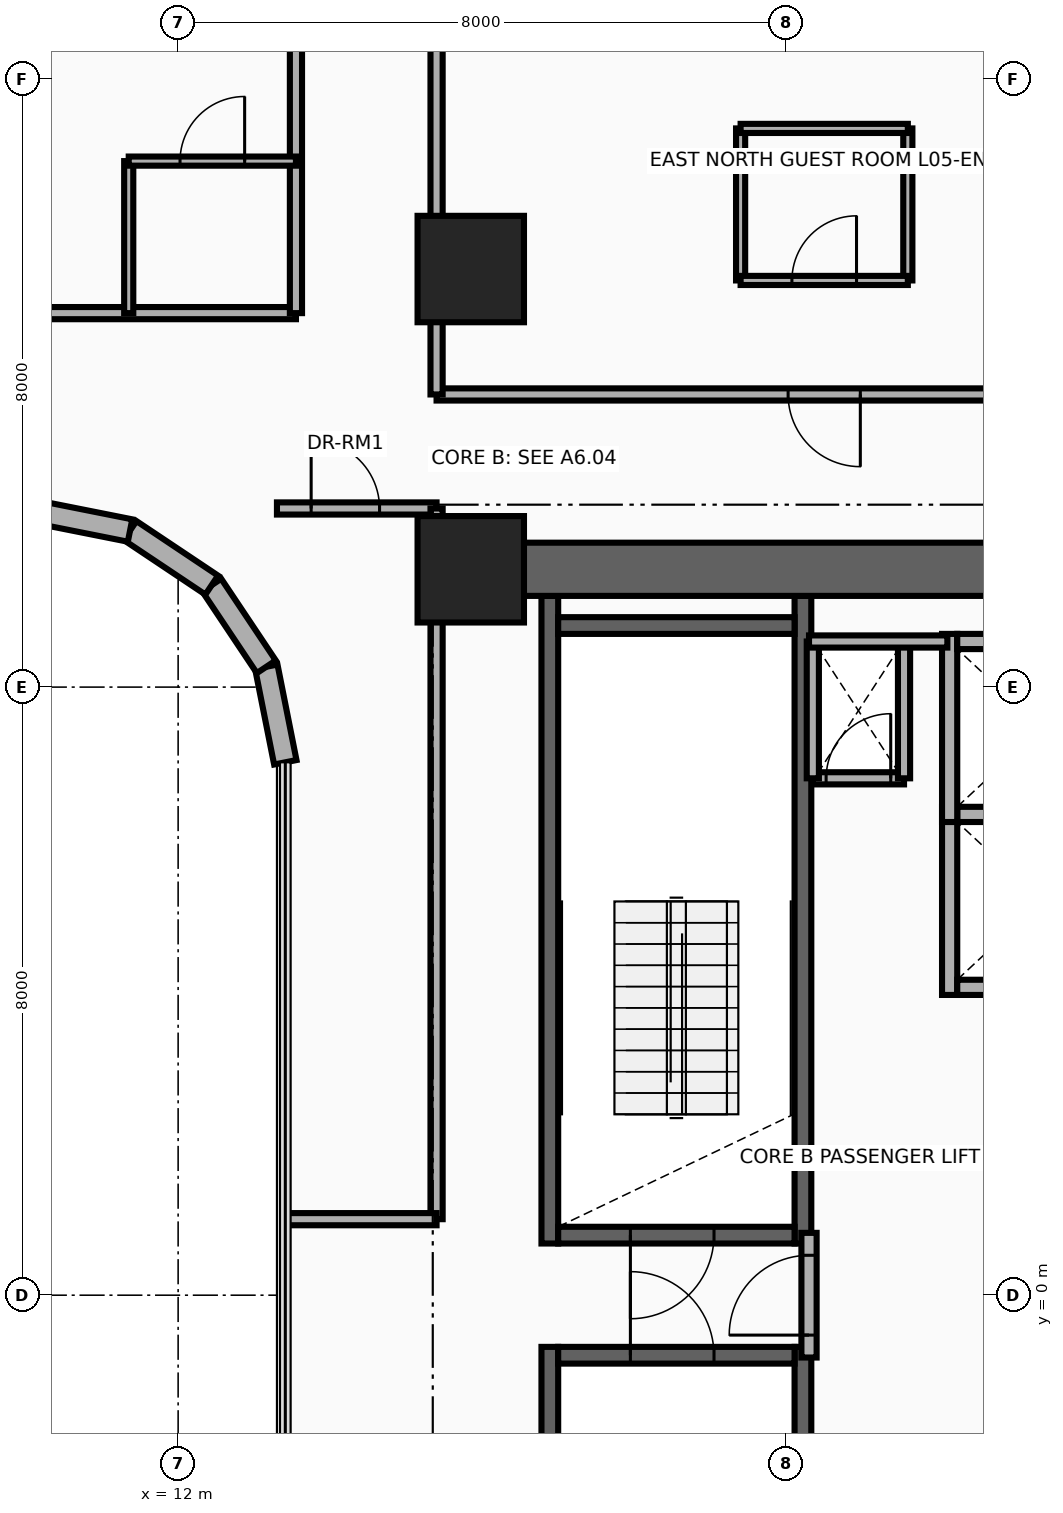
"""IFC4 building model, lengths in metres.
Left out: names, types, materials, properties, quantities, classifications, styles, units other than length and angle.
Written with IfcOpenShell. Run it as: python <this file> out.ifc"""

import sys

from ifc_helpers import new_model, si_unit, direction, frame, frame_2d, origin, origin_2d, place, context, subcontext, project, spatial, rectangle, extrude, source, transform, mapped, element, fill, save


model = new_model("IFC4")
c1 = context("Model", 3, precision=1e-05, world=origin(), true_north=direction((0.0, 1.0)))
c2 = subcontext(c1, "Body", "Model", "MODEL_VIEW")
j1 = project(units=[si_unit("LENGTHUNIT", "METRE"), si_unit("PLANEANGLEUNIT", "RADIAN")], contexts=[c1])
p1 = place(None, origin())
s1 = spatial("IfcSite", under=j1, at=p1, CompositionType="ELEMENT")
p2 = place(p1, origin())
s2 = spatial("IfcBuilding", under=s1, at=p2, CompositionType="ELEMENT")
p3 = place(p2, frame((0.0, 0.0, 26.0)))
s3 = spatial("IfcBuildingStorey", under=s2, at=p3, CompositionType="ELEMENT", Elevation=26.0)
for number, where, z_axis, x_axis in (
    (1, (16.89, 0.68, 0.0), (0.0, 0.0, 1.0), (0.0, 1.0, 0.0)),
    (2, (20.22, 0.68, 0.0), (0.0, 0.0, 1.0), (0.0, 1.0, 0.0)),
):
    element("IfcWall", number, at=place(p3, frame(where, z_axis=z_axis, x_axis=x_axis)), inside=s3, PredefinedType="SHEAR", context=c2, shape_type="SweptSolid", body=[
        extrude(rectangle(XDim=8.52, YDim=0.22, at=frame_2d((4.26, 0.0))), origin(), (0.0, 0.0, 1.0), 3.46),
    ])
p4 = place(p3, frame((17.0, 0.79, 0.0), z_axis=(0.0, 0.0, 1.0), x_axis=(1.0, 0.0, 0.0)))
e3 = element("IfcWall", 3, at=p4, inside=s3, PredefinedType="SHEAR", context=c2, shape_type="SweptSolid", body=[
    extrude(rectangle(XDim=3.11, YDim=0.22, at=frame_2d((1.555, 0.0))), origin(), (0.0, 0.0, 1.0), 3.46),
])
p5 = place(p4, frame((0.95, 0.0, 0.0)))
e4 = element("IfcOpeningElement", 4, at=p5, cuts=e3, PredefinedType="OPENING", context=c2, shape_type="SweptSolid", body=[
    extrude(rectangle(XDim=1.1, YDim=2.15, at=frame_2d((0.55, 1.075))), frame((0.0, 0.125, 0.0), z_axis=(0.0, -1.0, 0.0), x_axis=(1.0, 0.0, 0.0)), (0.0, 0.0, 1.0), 0.25),
])
p6 = place(p3, frame((17.0, 8.81, 0.0), z_axis=(0.0, 0.0, 1.0), x_axis=(1.0, 0.0, 0.0)))
e5 = element("IfcWall", 5, at=p6, inside=s3, PredefinedType="SHEAR", context=c2, shape_type="SweptSolid", body=[
    extrude(rectangle(XDim=3.11, YDim=0.22, at=frame_2d((1.555, 0.0))), origin(), (0.0, 0.0, 1.0), 3.46),
])
for number, where, z_axis, x_axis in (
    (6, (16.89, -9.2, 0.0), (0.0, 0.0, 1.0), (0.0, 1.0, 0.0)),
    (7, (20.22, -9.2, 0.0), (0.0, 0.0, 1.0), (0.0, 1.0, 0.0)),
):
    element("IfcWall", number, at=place(p3, frame(where, z_axis=z_axis, x_axis=x_axis)), inside=s3, PredefinedType="SHEAR", context=c2, shape_type="SweptSolid", body=[
        extrude(rectangle(XDim=8.52, YDim=0.22, at=frame_2d((4.26, 0.0))), origin(), (0.0, 0.0, 1.0), 3.46),
    ])
p7 = place(p3, frame((17.0, -0.79, 0.0), z_axis=(0.0, 0.0, 1.0), x_axis=(1.0, 0.0, 0.0)))
e8 = element("IfcWall", 8, at=p7, inside=s3, PredefinedType="SHEAR", context=c2, shape_type="SweptSolid", body=[
    extrude(rectangle(XDim=3.11, YDim=0.22, at=frame_2d((1.555, 0.0))), origin(), (0.0, 0.0, 1.0), 3.46),
])
p8 = place(p7, frame((0.95, 0.0, 0.0)))
e9 = element("IfcOpeningElement", 9, at=p8, cuts=e8, PredefinedType="OPENING", context=c2, shape_type="SweptSolid", body=[
    extrude(rectangle(XDim=1.1, YDim=2.15, at=frame_2d((0.55, 1.075))), frame((0.0, 0.125, 0.0), z_axis=(0.0, -1.0, 0.0), x_axis=(1.0, 0.0, 0.0)), (0.0, 0.0, 1.0), 0.25),
])
p9 = place(p3, frame((15.85, 9.55, 0.0), z_axis=(0.0, 0.0, 1.0), x_axis=(1.0, 0.0, 0.0)))
e10 = element("IfcWall", 10, at=p9, inside=s3, PredefinedType="SHEAR", context=c2, shape_type="SweptSolid", body=[
    extrude(rectangle(XDim=9.0, YDim=0.7, at=frame_2d((4.5, 0.0))), origin(), (0.0, 0.0, 1.0), 3.46),
])
m1 = source(origin(), c2, "Body", "SweptSolid", [
    extrude(rectangle(XDim=1.4, YDim=1.4, at=origin_2d()), origin(), (0.0, 0.0, 1.0), 3.7),
])
for number, where, z_axis, x_axis in (
    (11, (15.85, 9.55, 0.0), (0.0, 0.0, 1.0), (1.0, 0.0, 0.0)),
    (12, (15.85, 13.5, 0.0), (0.0, 0.0, 1.0), (1.0, 0.0, 0.0)),
):
    element("IfcColumn", number, at=place(p3, frame(where, z_axis=z_axis, x_axis=x_axis)), inside=s3, PredefinedType="COLUMN", context=c2, shape_type="MappedRepresentation", body=[
        mapped(m1, transform((0.0, 0.0, 0.0), x_axis=(1.0, 0.0, 0.0), y_axis=(0.0, 1.0, 0.0), z_axis=(0.0, 0.0, 1.0), scale=1.0)),
    ])
p10 = place(p3, frame((13.41, 7.011, 0.0), z_axis=(0.0, 0.0, 1.0), x_axis=(-0.195090163074, 0.980785312019, 0.0)))
e13 = element("IfcWall", 13, at=p10, inside=s3, PredefinedType="SOLIDWALL", context=c2, shape_type="SweptSolid", body=[
    extrude(rectangle(XDim=1.281, YDim=0.3, at=frame_2d((0.641, 0.0))), origin(), (0.0, 0.0, 1.0), 3.46),
])
for number, where, z_axis, x_axis in (
    (14, (13.16, 8.268, 0.0), (0.0, 0.0, 1.0), (-0.556, 0.831, 0.0)),
    (15, (12.442, 9.342, 0.0), (0.0, 0.0, 1.0), (-0.831, 0.556, 0.0)),
):
    element("IfcWall", number, at=place(p3, frame(where, z_axis=z_axis, x_axis=x_axis)), inside=s3, PredefinedType="SOLIDWALL", context=c2, shape_type="SweptSolid", body=[
        extrude(rectangle(XDim=1.292, YDim=0.3, at=frame_2d((0.646, 0.0))), origin(), (0.0, 0.0, 1.0), 3.46),
    ])
p11 = place(p3, frame((11.367, 10.06, 0.0), z_axis=(0.0, 0.0, 1.0), x_axis=(-0.980778058848, 0.195126623715, 0.0)))
e16 = element("IfcWall", 16, at=p11, inside=s3, PredefinedType="SOLIDWALL", context=c2, shape_type="SweptSolid", body=[
    extrude(rectangle(XDim=1.281, YDim=0.3, at=frame_2d((0.641, 0.0))), origin(), (0.0, 0.0, 1.0), 3.46),
])
p12 = place(p3, frame((22.15, 3.95, 0.0), z_axis=(0.0, 0.0, 1.0), x_axis=(0.0, 1.0, 0.0)))
e17 = element("IfcWall", 17, at=p12, inside=s3, PredefinedType="MOVABLE", context=c2, shape_type="SweptSolid", body=[
    extrude(rectangle(XDim=2.475, YDim=0.2, at=frame_2d((1.238, 0.0))), origin(), (0.0, 0.0, 1.0), 3.46),
])
for number, where, z_axis, x_axis in (
    (18, (22.25, 4.05, 0.0), (0.0, 0.0, 1.0), (1.0, 0.0, 0.0)),
    (19, (22.25, 6.325, 0.0), (0.0, 0.0, 1.0), (1.0, 0.0, 0.0)),
):
    element("IfcWall", number, at=place(p3, frame(where, z_axis=z_axis, x_axis=x_axis)), inside=s3, PredefinedType="MOVABLE", context=c2, shape_type="SweptSolid", body=[
        extrude(rectangle(XDim=2.23, YDim=0.2, at=frame_2d((1.115, 0.0))), origin(), (0.0, 0.0, 1.0), 2.245),
    ])
p13 = place(p3, frame((22.15, 6.225, 0.0), z_axis=(0.0, 0.0, 1.0), x_axis=(0.0, 1.0, 0.0)))
e20 = element("IfcWall", 20, at=p13, inside=s3, PredefinedType="MOVABLE", context=c2, shape_type="SweptSolid", body=[
    extrude(rectangle(XDim=2.475, YDim=0.2, at=frame_2d((1.237, 0.0))), origin(), (0.0, 0.0, 1.0), 3.46),
])
p14 = place(p3, frame((22.25, 8.6, 0.0), z_axis=(0.0, 0.0, 1.0), x_axis=(1.0, 0.0, 0.0)))
e21 = element("IfcWall", 21, at=p14, inside=s3, PredefinedType="MOVABLE", context=c2, shape_type="SweptSolid", body=[
    extrude(rectangle(XDim=2.23, YDim=0.2, at=frame_2d((1.115, 0.0))), origin(), (0.0, 0.0, 1.0), 2.245),
])
p15 = place(p3, frame((20.3, -0.82, 0.0), z_axis=(0.0, 0.0, 1.0), x_axis=(0.0, 1.0, 0.0)))
e22 = element("IfcWall", 22, at=p15, inside=s3, PredefinedType="PARTITIONING", context=c2, shape_type="SweptSolid", body=[
    extrude(rectangle(XDim=1.64, YDim=0.2, at=frame_2d((0.82, 0.0))), origin(), (0.0, 0.0, 1.0), 3.46),
])
p16 = place(p15, frame((0.295, 0.0, 0.0)))
e23 = element("IfcOpeningElement", 23, at=p16, cuts=e22, PredefinedType="OPENING", context=c2, shape_type="SweptSolid", body=[
    extrude(rectangle(XDim=1.05, YDim=2.15, at=frame_2d((0.525, 1.075))), frame((0.0, 0.115, 0.0), z_axis=(0.0, -1.0, 0.0), x_axis=(1.0, 0.0, 0.0)), (0.0, 0.0, 1.0), 0.23),
])
p17 = place(p3, frame((20.35, 6.8, 0.0), z_axis=(0.0, 0.0, 1.0), x_axis=(1.0, 0.0, 0.0)))
e24 = element("IfcWall", 24, at=p17, inside=s3, PredefinedType="PARTITIONING", context=c2, shape_type="SweptSolid", body=[
    extrude(rectangle(XDim=1.2, YDim=0.16, at=frame_2d((0.6, 0.0))), origin(), (0.0, 0.0, 1.0), 3.46),
])
p18 = place(p17, frame((0.175, 0.0, 0.0)))
e25 = element("IfcOpeningElement", 25, at=p18, cuts=e24, PredefinedType="OPENING", context=c2, shape_type="SweptSolid", body=[
    extrude(rectangle(XDim=0.85, YDim=2.05, at=frame_2d((0.425, 1.025))), frame((0.0, 0.095, 0.0), z_axis=(0.0, -1.0, 0.0), x_axis=(1.0, 0.0, 0.0)), (0.0, 0.0, 1.0), 0.19),
])
for number, where, z_axis, x_axis in (
    (26, (21.55, 6.8, 0.0), (0.0, 0.0, 1.0), (0.0, 1.0, 0.0)),
    (27, (20.35, 6.8, 0.0), (0.0, 0.0, 1.0), (0.0, 1.0, 0.0)),
):
    element("IfcWall", number, at=place(p3, frame(where, z_axis=z_axis, x_axis=x_axis)), inside=s3, PredefinedType="PARTITIONING", context=c2, shape_type="SweptSolid", body=[
        extrude(rectangle(XDim=1.8, YDim=0.16, at=frame_2d((0.9, 0.0))), origin(), (0.0, 0.0, 1.0), 3.46),
    ])
p19 = place(p3, frame((20.3, 8.6, 0.0), z_axis=(0.0, 0.0, 1.0), x_axis=(1.0, 0.0, 0.0)))
e28 = element("IfcWall", 28, at=p19, inside=s3, PredefinedType="PARTITIONING", context=c2, shape_type="SweptSolid", body=[
    extrude(rectangle(XDim=1.82, YDim=0.16, at=frame_2d((0.91, 0.0))), origin(), (0.0, 0.0, 1.0), 3.46),
])
p20 = place(p3, frame((-31.89, 12.92, 0.0), z_axis=(0.0, 0.0, 1.0), x_axis=(1.0, 0.0, 0.0)))
e29 = element("IfcWall", 29, at=p20, inside=s3, PredefinedType="PARTITIONING", context=c2, shape_type="SweptSolid", body=[
    extrude(rectangle(XDim=45.44, YDim=0.16, at=frame_2d((22.72, 0.0))), origin(), (0.0, 0.0, 1.0), 2.583),
])
p21 = place(p20, frame((4.225, 0.0, 0.0)))
e30 = element("IfcOpeningElement", 30, at=p21, cuts=e29, PredefinedType="OPENING", context=c2, shape_type="SweptSolid", body=[
    extrude(rectangle(XDim=0.95, YDim=2.15, at=frame_2d((0.475, 1.075))), frame((0.0, 0.095, 0.0), z_axis=(0.0, -1.0, 0.0), x_axis=(1.0, 0.0, 0.0)), (0.0, 0.0, 1.0), 0.19),
])
p22 = place(p20, frame((13.43, 0.0, 0.0)))
e31 = element("IfcOpeningElement", 31, at=p22, cuts=e29, PredefinedType="OPENING", context=c2, shape_type="SweptSolid", body=[
    extrude(rectangle(XDim=0.95, YDim=2.15, at=frame_2d((0.475, 1.075))), frame((0.0, 0.095, 0.0), z_axis=(0.0, -1.0, 0.0), x_axis=(1.0, 0.0, 0.0)), (0.0, 0.0, 1.0), 0.19),
])
p23 = place(p20, frame((20.31, 0.0, 0.0)))
e32 = element("IfcOpeningElement", 32, at=p23, cuts=e29, PredefinedType="OPENING", context=c2, shape_type="SweptSolid", body=[
    extrude(rectangle(XDim=0.95, YDim=2.15, at=frame_2d((0.475, 1.075))), frame((0.0, 0.095, 0.0), z_axis=(0.0, -1.0, 0.0), x_axis=(1.0, 0.0, 0.0)), (0.0, 0.0, 1.0), 0.19),
])
p24 = place(p20, frame((25.517, 0.0, 0.0)))
e33 = element("IfcOpeningElement", 33, at=p24, cuts=e29, PredefinedType="OPENING", context=c2, shape_type="SweptSolid", body=[
    extrude(rectangle(XDim=0.95, YDim=2.15, at=frame_2d((0.475, 1.075))), frame((0.0, 0.095, 0.0), z_axis=(0.0, -1.0, 0.0), x_axis=(1.0, 0.0, 0.0)), (0.0, 0.0, 1.0), 0.19),
])
p25 = place(p20, frame((28.373, 0.0, 0.0)))
e34 = element("IfcOpeningElement", 34, at=p25, cuts=e29, PredefinedType="OPENING", context=c2, shape_type="SweptSolid", body=[
    extrude(rectangle(XDim=0.95, YDim=2.15, at=frame_2d((0.475, 1.075))), frame((0.0, 0.095, 0.0), z_axis=(0.0, -1.0, 0.0), x_axis=(1.0, 0.0, 0.0)), (0.0, 0.0, 1.0), 0.19),
])
p26 = place(p20, frame((34.527, 0.0, 0.0)))
e35 = element("IfcOpeningElement", 35, at=p26, cuts=e29, PredefinedType="OPENING", context=c2, shape_type="SweptSolid", body=[
    extrude(rectangle(XDim=0.95, YDim=2.15, at=frame_2d((0.475, 1.075))), frame((0.0, 0.095, 0.0), z_axis=(0.0, -1.0, 0.0), x_axis=(1.0, 0.0, 0.0)), (0.0, 0.0, 1.0), 0.19),
])
p27 = place(p20, frame((39.36, 0.0, 0.0)))
e36 = element("IfcOpeningElement", 36, at=p27, cuts=e29, PredefinedType="OPENING", context=c2, shape_type="SweptSolid", body=[
    extrude(rectangle(XDim=0.95, YDim=2.15, at=frame_2d((0.475, 1.075))), frame((0.0, 0.095, 0.0), z_axis=(0.0, -1.0, 0.0), x_axis=(1.0, 0.0, 0.0)), (0.0, 0.0, 1.0), 0.19),
])
p28 = place(p3, frame((13.55, 12.92, 0.0), z_axis=(0.0, 0.0, 1.0), x_axis=(0.0, 1.0, 0.0)))
e37 = element("IfcWall", 37, at=p28, inside=s3, PredefinedType="PARTITIONING", context=c2, shape_type="SweptSolid", body=[
    extrude(rectangle(XDim=7.609, YDim=0.16, at=frame_2d((3.805, 0.0))), origin(), (0.0, 0.0, 1.0), 2.583),
])
p29 = place(p3, frame((11.35, 12.92, 0.0), z_axis=(0.0, 0.0, 1.0), x_axis=(0.0, 1.0, 0.0)))
e38 = element("IfcWall", 38, at=p29, inside=s3, PredefinedType="PARTITIONING", context=c2, shape_type="SweptSolid", body=[
    extrude(rectangle(XDim=2.0, YDim=0.12, at=frame_2d((1.0, 0.0))), origin(), (0.0, 0.0, 1.0), 2.583),
])
p30 = place(p3, frame((11.35, 14.92, 0.0), z_axis=(0.0, 0.0, 1.0), x_axis=(1.0, 0.0, 0.0)))
e39 = element("IfcWall", 39, at=p30, inside=s3, PredefinedType="PARTITIONING", context=c2, shape_type="SweptSolid", body=[
    extrude(rectangle(XDim=2.2, YDim=0.12, at=frame_2d((1.1, 0.0))), origin(), (0.0, 0.0, 1.0), 3.46),
])
p31 = place(p30, frame((0.675, 0.0, 0.0)))
e40 = element("IfcOpeningElement", 40, at=p31, cuts=e39, PredefinedType="OPENING", context=c2, shape_type="SweptSolid", body=[
    extrude(rectangle(XDim=0.85, YDim=2.1, at=frame_2d((0.425, 1.05))), frame((0.0, 0.075, 0.0), z_axis=(0.0, -1.0, 0.0), x_axis=(1.0, 0.0, 0.0)), (0.0, 0.0, 1.0), 0.15),
])
p32 = place(p3, frame((15.4, 11.85, 0.0), z_axis=(0.0, 0.0, 1.0), x_axis=(1.0, 0.0, 0.0)))
e41 = element("IfcWall", 41, at=p32, inside=s3, PredefinedType="PARTITIONING", context=c2, shape_type="SweptSolid", body=[
    extrude(rectangle(XDim=10.2, YDim=0.16, at=frame_2d((5.1, 0.0))), origin(), (0.0, 0.0, 1.0), 2.834),
])
p33 = place(p32, frame((4.625, 0.0, 0.0)))
e42 = element("IfcOpeningElement", 42, at=p33, cuts=e41, PredefinedType="OPENING", context=c2, shape_type="SweptSolid", body=[
    extrude(rectangle(XDim=0.95, YDim=2.15, at=frame_2d((0.475, 1.075))), frame((0.0, 0.095, 0.0), z_axis=(0.0, -1.0, 0.0), x_axis=(1.0, 0.0, 0.0)), (0.0, 0.0, 1.0), 0.19),
])
p34 = place(p3, frame((15.4, 11.85, 0.0), z_axis=(0.0, 0.0, 1.0), x_axis=(0.0, 1.0, 0.0)))
e43 = element("IfcWall", 43, at=p34, inside=s3, PredefinedType="PARTITIONING", context=c2, shape_type="SweptSolid", body=[
    extrude(rectangle(XDim=6.15, YDim=0.16, at=frame_2d((3.075, 0.0))), origin(), (0.0, 0.0, 1.0), 2.583),
])
for number, where, z_axis, x_axis in (
    (44, (19.4, 13.35, 0.0), (0.0, 0.0, 1.0), (0.0, 1.0, 0.0)),
    (45, (21.6, 13.35, 0.0), (0.0, 0.0, 1.0), (0.0, 1.0, 0.0)),
):
    element("IfcWall", number, at=place(p3, frame(where, z_axis=z_axis, x_axis=x_axis)), inside=s3, PredefinedType="PARTITIONING", context=c2, shape_type="SweptSolid", body=[
        extrude(rectangle(XDim=2.0, YDim=0.12, at=frame_2d((1.0, 0.0))), origin(), (0.0, 0.0, 1.0), 2.583),
    ])
p35 = place(p3, frame((19.4, 15.35, 0.0), z_axis=(0.0, 0.0, 1.0), x_axis=(1.0, 0.0, 0.0)))
e46 = element("IfcWall", 46, at=p35, inside=s3, PredefinedType="PARTITIONING", context=c2, shape_type="SweptSolid", body=[
    extrude(rectangle(XDim=2.2, YDim=0.12, at=frame_2d((1.1, 0.0))), origin(), (0.0, 0.0, 1.0), 3.46),
])
p36 = place(p3, frame((19.4, 13.35, 0.0), z_axis=(0.0, 0.0, 1.0), x_axis=(1.0, 0.0, 0.0)))
e47 = element("IfcWall", 47, at=p36, inside=s3, PredefinedType="PARTITIONING", context=c2, shape_type="SweptSolid", body=[
    extrude(rectangle(XDim=2.2, YDim=0.12, at=frame_2d((1.1, 0.0))), origin(), (0.0, 0.0, 1.0), 2.583),
])
p37 = place(p36, frame((0.675, 0.0, 0.0)))
e48 = element("IfcOpeningElement", 48, at=p37, cuts=e47, PredefinedType="OPENING", context=c2, shape_type="SweptSolid", body=[
    extrude(rectangle(XDim=0.85, YDim=2.1, at=frame_2d((0.425, 1.05))), frame((0.0, 0.075, 0.0), z_axis=(0.0, -1.0, 0.0), x_axis=(1.0, 0.0, 0.0)), (0.0, 0.0, 1.0), 0.15),
])
p38 = place(p3, frame((13.3, 10.35, 0.0), z_axis=(0.0, 0.0, 1.0), x_axis=(1.0, 0.0, 0.0)))
e49 = element("IfcWall", 49, at=p38, inside=s3, PredefinedType="PARTITIONING", context=c2, shape_type="SweptSolid", body=[
    extrude(rectangle(XDim=2.1, YDim=0.16, at=frame_2d((1.05, 0.0))), origin(), (0.0, 0.0, 1.0), 2.583),
])
p39 = place(p38, frame((0.45, 0.0, 0.0)))
e50 = element("IfcOpeningElement", 50, at=p39, cuts=e49, PredefinedType="OPENING", context=c2, shape_type="SweptSolid", body=[
    extrude(rectangle(XDim=0.9, YDim=2.1, at=frame_2d((0.45, 1.05))), frame((0.0, 0.095, 0.0), z_axis=(0.0, -1.0, 0.0), x_axis=(1.0, 0.0, 0.0)), (0.0, 0.0, 1.0), 0.19),
])
p40 = place(p3, frame((15.4, 1.0, 0.0), z_axis=(0.0, 0.0, 1.0), x_axis=(0.0, 1.0, 0.0)))
e51 = element("IfcWall", 51, at=p40, inside=s3, PredefinedType="PARTITIONING", context=c2, shape_type="SweptSolid", body=[
    extrude(rectangle(XDim=9.35, YDim=0.16, at=frame_2d((4.675, 0.0))), origin(), (0.0, 0.0, 1.0), 2.245),
])
p41 = place(p3, frame((13.41, 1.0, 0.0), z_axis=(0.0, 0.0, 1.0), x_axis=(1.0, 0.0, 0.0)))
e52 = element("IfcWall", 52, at=p41, inside=s3, PredefinedType="PARTITIONING", context=c2, shape_type="SweptSolid", body=[
    extrude(rectangle(XDim=1.99, YDim=0.16, at=frame_2d((0.995, 0.0))), origin(), (0.0, 0.0, 1.0), 2.245),
])
p42 = place(p16, origin())
e53 = element("IfcDoor", 53, at=p42, inside=s3, OperationType="SINGLE_SWING_RIGHT", PredefinedType="DOOR", context=c2, shape_type="SweptSolid", body=[
    extrude(rectangle(XDim=1.05, YDim=2.15, at=frame_2d((0.525, 1.075))), frame((0.0, 0.025, 0.0), z_axis=(0.0, -1.0, 0.0), x_axis=(1.0, 0.0, 0.0)), (0.0, 0.0, 1.0), 0.05),
])
fill(e23, e53)
p43 = place(p5, frame((1.1, 0.0, 0.0), z_axis=(0.0, 0.0, 1.0), x_axis=(-1.0, 0.0, 0.0)))
e54 = element("IfcDoor", 54, at=p43, inside=s3, OperationType="SINGLE_SWING_LEFT", PredefinedType="DOOR", context=c2, shape_type="SweptSolid", body=[
    extrude(rectangle(XDim=1.1, YDim=2.15, at=frame_2d((0.55, 1.075))), frame((0.0, 0.025, 0.0), z_axis=(0.0, -1.0, 0.0), x_axis=(1.0, 0.0, 0.0)), (0.0, 0.0, 1.0), 0.05),
])
fill(e4, e54)
p44 = place(p8, origin())
e55 = element("IfcDoor", 55, at=p44, inside=s3, OperationType="SINGLE_SWING_RIGHT", PredefinedType="DOOR", context=c2, shape_type="SweptSolid", body=[
    extrude(rectangle(XDim=1.1, YDim=2.15, at=frame_2d((0.55, 1.075))), frame((0.0, 0.025, 0.0), z_axis=(0.0, -1.0, 0.0), x_axis=(1.0, 0.0, 0.0)), (0.0, 0.0, 1.0), 0.05),
])
fill(e9, e55)
p45 = place(p18, origin())
e56 = element("IfcDoor", 56, at=p45, inside=s3, OperationType="SINGLE_SWING_LEFT", PredefinedType="DOOR", context=c2, shape_type="SweptSolid", body=[
    extrude(rectangle(XDim=0.85, YDim=2.05, at=frame_2d((0.425, 1.025))), frame((0.0, 0.025, 0.0), z_axis=(0.0, -1.0, 0.0), x_axis=(1.0, 0.0, 0.0)), (0.0, 0.0, 1.0), 0.05),
])
fill(e25, e56)
p46 = place(p31, origin())
e57 = element("IfcDoor", 57, at=p46, inside=s3, OperationType="SINGLE_SWING_RIGHT", PredefinedType="DOOR", context=c2, shape_type="SweptSolid", body=[
    extrude(rectangle(XDim=0.85, YDim=2.1, at=frame_2d((0.425, 1.05))), frame((0.0, 0.025, 0.0), z_axis=(0.0, -1.0, 0.0), x_axis=(1.0, 0.0, 0.0)), (0.0, 0.0, 1.0), 0.05),
])
fill(e40, e57)
p47 = place(p33, frame((0.95, 0.0, 0.0), z_axis=(0.0, 0.0, 1.0), x_axis=(-1.0, 0.0, 0.0)))
e58 = element("IfcDoor", 58, at=p47, inside=s3, OperationType="SINGLE_SWING_LEFT", PredefinedType="DOOR", context=c2, shape_type="SweptSolid", body=[
    extrude(rectangle(XDim=0.95, YDim=2.15, at=frame_2d((0.475, 1.075))), frame((0.0, 0.025, 0.0), z_axis=(0.0, -1.0, 0.0), x_axis=(1.0, 0.0, 0.0)), (0.0, 0.0, 1.0), 0.05),
])
fill(e42, e58)
p48 = place(p37, origin())
e59 = element("IfcDoor", 59, at=p48, inside=s3, OperationType="SINGLE_SWING_RIGHT", PredefinedType="DOOR", context=c2, shape_type="SweptSolid", body=[
    extrude(rectangle(XDim=0.85, YDim=2.1, at=frame_2d((0.425, 1.05))), frame((0.0, 0.025, 0.0), z_axis=(0.0, -1.0, 0.0), x_axis=(1.0, 0.0, 0.0)), (0.0, 0.0, 1.0), 0.05),
])
fill(e48, e59)
p49 = place(p39, origin())
e60 = element("IfcDoor", 60, at=p49, inside=s3, OperationType="SINGLE_SWING_RIGHT", PredefinedType="DOOR", context=c2, shape_type="SweptSolid", body=[
    extrude(rectangle(XDim=0.9, YDim=2.1, at=frame_2d((0.45, 1.05))), frame((0.0, 0.025, 0.0), z_axis=(0.0, -1.0, 0.0), x_axis=(1.0, 0.0, 0.0)), (0.0, 0.0, 1.0), 0.05),
])
fill(e50, e60)
save(model, sys.argv[1])
